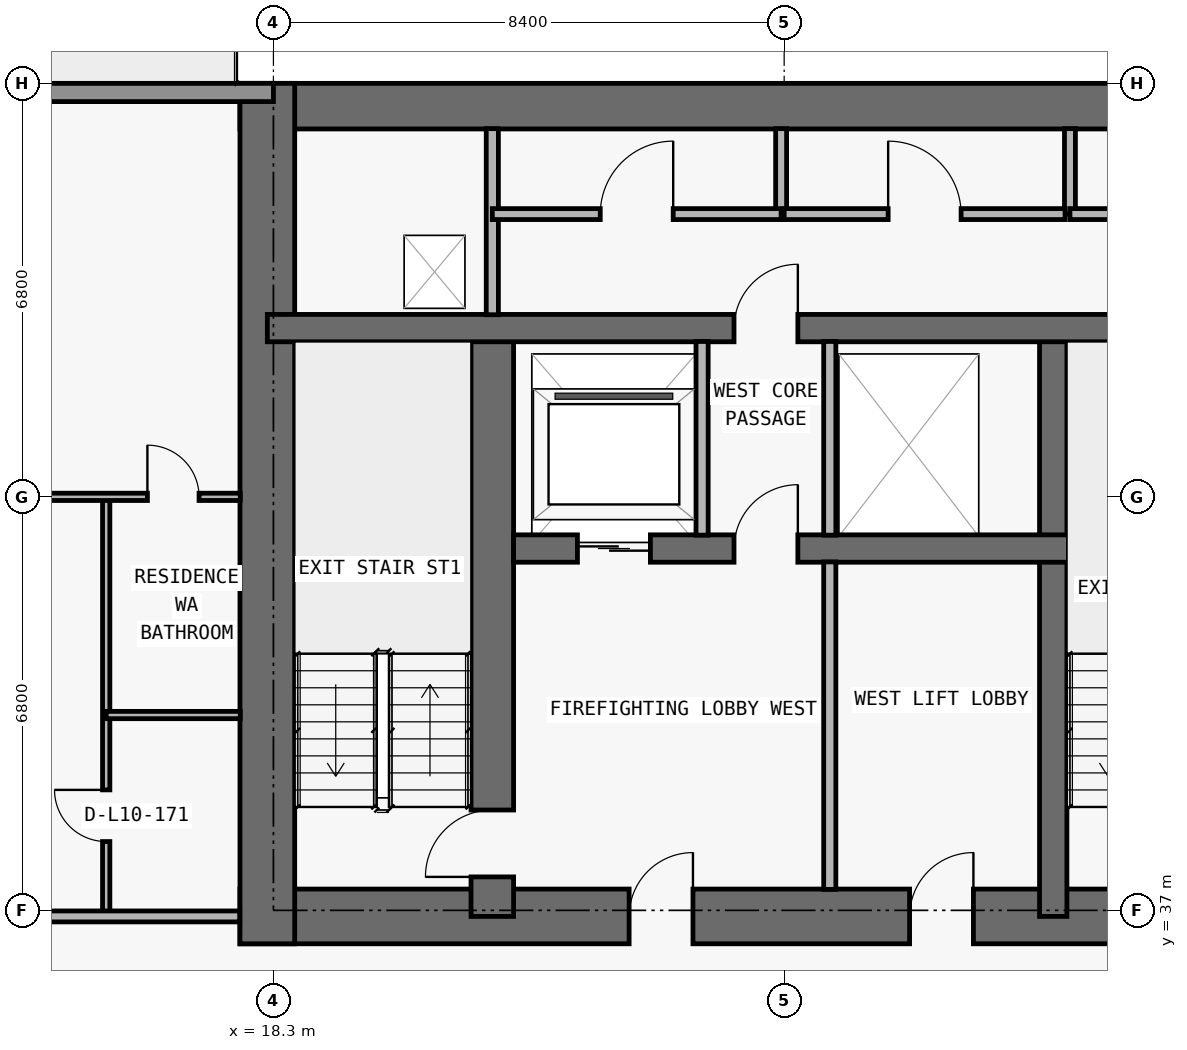
"""IFC4 building model, lengths in metres.
Left out: names, types, materials, properties, quantities, classifications, styles, units other than length and angle.
Written with IfcOpenShell. Run it as: python <this file> out.ifc"""

import sys

from ifc_helpers import new_model, si_unit, direction, frame, frame_2d, origin, place, context, subcontext, project, spatial, rectangle, extrude, element, fill, save


model = new_model("IFC4")
c1 = context("Model", 3, precision=1e-05, world=origin(), true_north=direction((0.0, 1.0)))
c2 = subcontext(c1, "Body", "Model", "MODEL_VIEW")
j1 = project(units=[si_unit("LENGTHUNIT", "METRE"), si_unit("PLANEANGLEUNIT", "RADIAN")], contexts=[c1])
p1 = place(None, origin())
s1 = spatial("IfcSite", under=j1, at=p1, CompositionType="ELEMENT")
p2 = place(p1, origin())
s2 = spatial("IfcBuilding", under=s1, at=p2, CompositionType="ELEMENT")
p3 = place(p2, frame((0.0, 0.0, 43.2)))
s3 = spatial("IfcBuildingStorey", under=s2, at=p3, CompositionType="ELEMENT", Elevation=43.2)
p4 = place(p3, frame((17.75, 36.9, 0.0), z_axis=(0.0, 0.0, 1.0), x_axis=(1.0, 0.0, 0.0)))
e1 = element("IfcWall", 1, at=p4, inside=s3, PredefinedType="SHEAR", context=c2, shape_type="SweptSolid", body=[
    extrude(rectangle(XDim=42.3, YDim=0.9, at=frame_2d((21.15, 0.0))), origin(), (0.0, 0.0, 1.0), 3.05),
])
p5 = place(p4, frame((14.55, 0.0, 0.0)))
e2 = element("IfcOpeningElement", 2, at=p5, cuts=e1, PredefinedType="OPENING", context=c2, shape_type="SweptSolid", body=[
    extrude(rectangle(XDim=1.1, YDim=2.15, at=frame_2d((0.55, 1.075))), frame((0.0, 0.46, 0.0), z_axis=(0.0, -1.0, 0.0), x_axis=(1.0, 0.0, 0.0)), (0.0, 0.0, 1.0), 0.92),
])
p6 = place(p4, frame((6.4, 0.0, 0.0)))
e3 = element("IfcOpeningElement", 3, at=p6, cuts=e1, PredefinedType="OPENING", context=c2, shape_type="SweptSolid", body=[
    extrude(rectangle(XDim=1.05, YDim=2.15, at=frame_2d((0.525, 1.075))), frame((0.0, 0.46, 0.0), z_axis=(0.0, -1.0, 0.0), x_axis=(1.0, 0.0, 0.0)), (0.0, 0.0, 1.0), 0.92),
])
p7 = place(p4, frame((34.9, 0.0, 0.0)))
e4 = element("IfcOpeningElement", 4, at=p7, cuts=e1, PredefinedType="OPENING", context=c2, shape_type="SweptSolid", body=[
    extrude(rectangle(XDim=1.05, YDim=2.15, at=frame_2d((0.525, 1.075))), frame((0.0, 0.46, 0.0), z_axis=(0.0, -1.0, 0.0), x_axis=(1.0, 0.0, 0.0)), (0.0, 0.0, 1.0), 0.92),
])
p8 = place(p4, frame((11.012, 0.0, 0.0)))
e5 = element("IfcOpeningElement", 5, at=p8, cuts=e1, PredefinedType="OPENING", context=c2, shape_type="SweptSolid", body=[
    extrude(rectangle(XDim=1.05, YDim=2.15, at=frame_2d((0.525, 1.075))), frame((0.0, 0.46, 0.0), z_axis=(0.0, -1.0, 0.0), x_axis=(1.0, 0.0, 0.0)), (0.0, 0.0, 1.0), 0.92),
])
p9 = place(p4, frame((24.25, 0.0, 0.0)))
e6 = element("IfcOpeningElement", 6, at=p9, cuts=e1, PredefinedType="OPENING", context=c2, shape_type="SweptSolid", body=[
    extrude(rectangle(XDim=1.05, YDim=2.15, at=frame_2d((0.525, 1.075))), frame((0.0, 0.46, 0.0), z_axis=(0.0, -1.0, 0.0), x_axis=(1.0, 0.0, 0.0)), (0.0, 0.0, 1.0), 0.92),
])
p10 = place(p3, frame((17.75, 50.225, 0.0), z_axis=(0.0, 0.0, 1.0), x_axis=(1.0, 0.0, 0.0)))
e7 = element("IfcWall", 7, at=p10, inside=s3, PredefinedType="SHEAR", context=c2, shape_type="SweptSolid", body=[
    extrude(rectangle(XDim=42.3, YDim=0.75, at=frame_2d((21.15, 0.0))), origin(), (0.0, 0.0, 1.0), 3.05),
])
p11 = place(p3, frame((18.2, 36.45, 0.0), z_axis=(0.0, 0.0, 1.0), x_axis=(0.0, 1.0, 0.0)))
e8 = element("IfcWall", 8, at=p11, inside=s3, PredefinedType="SHEAR", context=c2, shape_type="SweptSolid", body=[
    extrude(rectangle(XDim=14.15, YDim=0.9, at=frame_2d((7.075, 0.0))), origin(), (0.0, 0.0, 1.0), 3.05),
])
p12 = place(p3, frame((21.9, 36.9, 0.0), z_axis=(0.0, 0.0, 1.0), x_axis=(0.0, 1.0, 0.0)))
e9 = element("IfcWall", 9, at=p12, inside=s3, PredefinedType="SHEAR", context=c2, shape_type="SweptSolid", body=[
    extrude(rectangle(XDim=9.675, YDim=0.7, at=frame_2d((4.837, 0.0))), origin(), (0.0, 0.0, 1.0), 3.05),
])
p13 = place(p12, frame((0.65, 0.0, 0.0)))
e10 = element("IfcOpeningElement", 10, at=p13, cuts=e9, PredefinedType="OPENING", context=c2, shape_type="SweptSolid", body=[
    extrude(rectangle(XDim=1.1, YDim=2.15, at=frame_2d((0.55, 1.075))), frame((0.0, 0.36, 0.0), z_axis=(0.0, -1.0, 0.0), x_axis=(1.0, 0.0, 0.0)), (0.0, 0.0, 1.0), 0.72),
])
p14 = place(p3, frame((31.125, 36.9, 0.0), z_axis=(0.0, 0.0, 1.0), x_axis=(0.0, 1.0, 0.0)))
e11 = element("IfcWall", 11, at=p14, inside=s3, PredefinedType="SHEAR", context=c2, shape_type="SweptSolid", body=[
    extrude(rectangle(XDim=9.675, YDim=0.45, at=frame_2d((4.837, 0.0))), origin(), (0.0, 0.0, 1.0), 3.05),
])
p15 = place(p3, frame((22.25, 42.95, 0.0), z_axis=(0.0, 0.0, 1.0), x_axis=(1.0, 0.0, 0.0)))
e12 = element("IfcWall", 12, at=p15, inside=s3, PredefinedType="SHEAR", context=c2, shape_type="SweptSolid", body=[
    extrude(rectangle(XDim=33.3, YDim=0.45, at=frame_2d((16.65, 0.0))), origin(), (0.0, 0.0, 1.0), 3.05),
])
p16 = place(p15, frame((1.05, 0.0, 0.0)))
e13 = element("IfcOpeningElement", 13, at=p16, cuts=e12, PredefinedType="OPENING", context=c2, shape_type="SweptSolid", body=[
    extrude(rectangle(XDim=1.2, YDim=2.2, at=frame_2d((0.6, 1.1))), frame((0.0, 0.235, 0.0), z_axis=(0.0, -1.0, 0.0), x_axis=(1.0, 0.0, 0.0)), (0.0, 0.0, 1.0), 0.47),
])
p17 = place(p15, frame((31.05, 0.0, 0.0)))
e14 = element("IfcOpeningElement", 14, at=p17, cuts=e12, PredefinedType="OPENING", context=c2, shape_type="SweptSolid", body=[
    extrude(rectangle(XDim=1.2, YDim=2.2, at=frame_2d((0.6, 1.1))), frame((0.0, 0.235, 0.0), z_axis=(0.0, -1.0, 0.0), x_axis=(1.0, 0.0, 0.0)), (0.0, 0.0, 1.0), 0.47),
])
p18 = place(p15, frame((13.5, 0.0, 0.0)))
e15 = element("IfcOpeningElement", 15, at=p18, cuts=e12, PredefinedType="OPENING", context=c2, shape_type="SweptSolid", body=[
    extrude(rectangle(XDim=1.1, YDim=2.2, at=frame_2d((0.55, 1.1))), frame((0.0, 0.235, 0.0), z_axis=(0.0, -1.0, 0.0), x_axis=(1.0, 0.0, 0.0)), (0.0, 0.0, 1.0), 0.47),
])
p19 = place(p15, frame((16.1, 0.0, 0.0)))
e16 = element("IfcOpeningElement", 16, at=p19, cuts=e12, PredefinedType="OPENING", context=c2, shape_type="SweptSolid", body=[
    extrude(rectangle(XDim=1.1, YDim=2.2, at=frame_2d((0.55, 1.1))), frame((0.0, 0.235, 0.0), z_axis=(0.0, -1.0, 0.0), x_axis=(1.0, 0.0, 0.0)), (0.0, 0.0, 1.0), 0.47),
])
p20 = place(p15, frame((18.7, 0.0, 0.0)))
e17 = element("IfcOpeningElement", 17, at=p20, cuts=e12, PredefinedType="OPENING", context=c2, shape_type="SweptSolid", body=[
    extrude(rectangle(XDim=1.1, YDim=2.2, at=frame_2d((0.55, 1.1))), frame((0.0, 0.235, 0.0), z_axis=(0.0, -1.0, 0.0), x_axis=(1.0, 0.0, 0.0)), (0.0, 0.0, 1.0), 0.47),
])
p21 = place(p15, frame((3.625, 0.0, 0.0)))
e18 = element("IfcOpeningElement", 18, at=p21, cuts=e12, PredefinedType="OPENING", context=c2, shape_type="SweptSolid", body=[
    extrude(rectangle(XDim=1.05, YDim=2.15, at=frame_2d((0.525, 1.075))), frame((0.0, 0.235, 0.0), z_axis=(0.0, -1.0, 0.0), x_axis=(1.0, 0.0, 0.0)), (0.0, 0.0, 1.0), 0.47),
])
p22 = place(p15, frame((28.675, 0.0, 0.0)))
e19 = element("IfcOpeningElement", 19, at=p22, cuts=e12, PredefinedType="OPENING", context=c2, shape_type="SweptSolid", body=[
    extrude(rectangle(XDim=1.05, YDim=2.15, at=frame_2d((0.525, 1.075))), frame((0.0, 0.235, 0.0), z_axis=(0.0, -1.0, 0.0), x_axis=(1.0, 0.0, 0.0)), (0.0, 0.0, 1.0), 0.47),
])
p23 = place(p3, frame((18.2, 46.575, 0.0), z_axis=(0.0, 0.0, 1.0), x_axis=(1.0, 0.0, 0.0)))
e20 = element("IfcWall", 20, at=p23, inside=s3, PredefinedType="SHEAR", context=c2, shape_type="SweptSolid", body=[
    extrude(rectangle(XDim=41.4, YDim=0.45, at=frame_2d((20.7, 0.0))), origin(), (0.0, 0.0, 1.0), 3.05),
])
p24 = place(p23, frame((7.675, 0.0, 0.0)))
e21 = element("IfcOpeningElement", 21, at=p24, cuts=e20, PredefinedType="OPENING", context=c2, shape_type="SweptSolid", body=[
    extrude(rectangle(XDim=1.05, YDim=2.15, at=frame_2d((0.525, 1.075))), frame((0.0, 0.235, 0.0), z_axis=(0.0, -1.0, 0.0), x_axis=(1.0, 0.0, 0.0)), (0.0, 0.0, 1.0), 0.47),
])
p25 = place(p23, frame((32.725, 0.0, 0.0)))
e22 = element("IfcOpeningElement", 22, at=p25, cuts=e20, PredefinedType="OPENING", context=c2, shape_type="SweptSolid", body=[
    extrude(rectangle(XDim=1.05, YDim=2.15, at=frame_2d((0.525, 1.075))), frame((0.0, 0.235, 0.0), z_axis=(0.0, -1.0, 0.0), x_axis=(1.0, 0.0, 0.0)), (0.0, 0.0, 1.0), 0.47),
])
p26 = place(p3, frame((5.1, 50.45, 0.0), z_axis=(0.0, 0.0, 1.0), x_axis=(1.0, 0.0, 0.0)))
e23 = element("IfcWall", 23, at=p26, inside=s3, PredefinedType="STANDARD", context=c2, shape_type="SweptSolid", body=[
    extrude(rectangle(XDim=13.2, YDim=0.3, at=frame_2d((6.6, 0.0))), origin(), (0.0, 0.0, 1.0), 3.05),
])
p27 = place(p26, frame((5.6, 0.0, 0.0)))
e24 = element("IfcOpeningElement", 24, at=p27, cuts=e23, PredefinedType="OPENING", context=c2, shape_type="SweptSolid", body=[
    extrude(rectangle(XDim=2.0, YDim=2.3, at=frame_2d((1.0, 1.15))), frame((0.0, 0.16, 0.0), z_axis=(0.0, -1.0, 0.0), x_axis=(1.0, 0.0, 0.0)), (0.0, 0.0, 1.0), 0.32),
])
p28 = place(p3, frame((15.55, 36.9, 0.0), z_axis=(0.0, 0.0, 1.0), x_axis=(0.0, 1.0, 0.0)))
e25 = element("IfcWall", 25, at=p28, inside=s3, PredefinedType="PARTITIONING", context=c2, shape_type="SweptSolid", body=[
    extrude(rectangle(XDim=6.9, YDim=0.12, at=frame_2d((3.45, 0.0))), origin(), (0.0, 0.0, 1.0), 3.05),
])
p29 = place(p28, frame((1.231, 0.0, 0.0)))
e26 = element("IfcOpeningElement", 26, at=p29, cuts=e25, PredefinedType="OPENING", context=c2, shape_type="SweptSolid", body=[
    extrude(rectangle(XDim=0.85, YDim=2.1, at=frame_2d((0.425, 1.05))), frame((0.0, 0.07, 0.0), z_axis=(0.0, -1.0, 0.0), x_axis=(1.0, 0.0, 0.0)), (0.0, 0.0, 1.0), 0.14),
])
p30 = place(p3, frame((21.9, 46.795, 0.0), z_axis=(0.0, 0.0, 1.0), x_axis=(0.0, 1.0, 0.0)))
e27 = element("IfcWall", 27, at=p30, inside=s3, PredefinedType="PARTITIONING", context=c2, shape_type="SweptSolid", body=[
    extrude(rectangle(XDim=3.06, YDim=0.2, at=frame_2d((1.53, 0.0))), origin(), (0.0, 0.0, 1.0), 3.05),
])
p31 = place(p3, frame((25.35, 43.17, 0.0), z_axis=(0.0, 0.0, 1.0), x_axis=(0.0, 1.0, 0.0)))
e28 = element("IfcWall", 28, at=p31, inside=s3, PredefinedType="PARTITIONING", context=c2, shape_type="SweptSolid", body=[
    extrude(rectangle(XDim=3.185, YDim=0.2, at=frame_2d((1.593, 0.0))), origin(), (0.0, 0.0, 1.0), 3.05),
])
p32 = place(p3, frame((26.65, 48.45, 0.0), z_axis=(0.0, 0.0, 1.0), x_axis=(0.0, 1.0, 0.0)))
e29 = element("IfcWall", 29, at=p32, inside=s3, PredefinedType="PARTITIONING", context=c2, shape_type="SweptSolid", body=[
    extrude(rectangle(XDim=1.405, YDim=0.18, at=frame_2d((0.703, 0.0))), origin(), (0.0, 0.0, 1.0), 3.05),
])
p33 = place(p3, frame((27.45, 37.345, 0.0), z_axis=(0.0, 0.0, 1.0), x_axis=(0.0, 1.0, 0.0)))
e30 = element("IfcWall", 30, at=p33, inside=s3, PredefinedType="PARTITIONING", context=c2, shape_type="SweptSolid", body=[
    extrude(rectangle(XDim=5.385, YDim=0.2, at=frame_2d((2.692, 0.0))), origin(), (0.0, 0.0, 1.0), 3.05),
])
p34 = place(p3, frame((27.45, 43.17, 0.0), z_axis=(0.0, 0.0, 1.0), x_axis=(0.0, 1.0, 0.0)))
e31 = element("IfcWall", 31, at=p34, inside=s3, PredefinedType="PARTITIONING", context=c2, shape_type="SweptSolid", body=[
    extrude(rectangle(XDim=3.185, YDim=0.2, at=frame_2d((1.593, 0.0))), origin(), (0.0, 0.0, 1.0), 3.05),
])
p35 = place(p3, frame((31.4, 48.45, 0.0), z_axis=(0.0, 0.0, 1.0), x_axis=(0.0, 1.0, 0.0)))
e32 = element("IfcWall", 32, at=p35, inside=s3, PredefinedType="PARTITIONING", context=c2, shape_type="SweptSolid", body=[
    extrude(rectangle(XDim=1.405, YDim=0.18, at=frame_2d((0.703, 0.0))), origin(), (0.0, 0.0, 1.0), 3.05),
])
p36 = place(p3, frame((5.1, 36.9, 0.0), z_axis=(0.0, 0.0, 1.0), x_axis=(1.0, 0.0, 0.0)))
e33 = element("IfcWall", 33, at=p36, inside=s3, PredefinedType="PARTITIONING", context=c2, shape_type="SweptSolid", body=[
    extrude(rectangle(XDim=12.645, YDim=0.18, at=frame_2d((6.323, 0.0))), origin(), (0.0, 0.0, 1.0), 3.05),
])
p37 = place(p36, frame((7.125, 0.0, 0.0)))
e34 = element("IfcOpeningElement", 34, at=p37, cuts=e33, PredefinedType="OPENING", context=c2, shape_type="SweptSolid", body=[
    extrude(rectangle(XDim=1.0, YDim=2.2, at=frame_2d((0.5, 1.1))), frame((0.0, 0.1, 0.0), z_axis=(0.0, -1.0, 0.0), x_axis=(1.0, 0.0, 0.0)), (0.0, 0.0, 1.0), 0.2),
])
p38 = place(p3, frame((15.55, 40.212, 0.0), z_axis=(0.0, 0.0, 1.0), x_axis=(1.0, 0.0, 0.0)))
e35 = element("IfcWall", 35, at=p38, inside=s3, PredefinedType="PARTITIONING", context=c2, shape_type="SweptSolid", body=[
    extrude(rectangle(XDim=2.205, YDim=0.12, at=frame_2d((1.103, 0.0))), origin(), (0.0, 0.0, 1.0), 3.05),
])
p39 = place(p3, frame((1.795, 43.8, 0.0), z_axis=(0.0, 0.0, 1.0), x_axis=(1.0, 0.0, 0.0)))
e36 = element("IfcWall", 36, at=p39, inside=s3, PredefinedType="PARTITIONING", context=c2, shape_type="SweptSolid", body=[
    extrude(rectangle(XDim=15.96, YDim=0.12, at=frame_2d((7.98, 0.0))), origin(), (0.0, 0.0, 1.0), 2.339),
])
p40 = place(p39, frame((5.255, 0.0, 0.0)))
e37 = element("IfcOpeningElement", 37, at=p40, cuts=e36, PredefinedType="OPENING", context=c2, shape_type="SweptSolid", body=[
    extrude(rectangle(XDim=0.9, YDim=2.15, at=frame_2d((0.45, 1.075))), frame((0.0, 0.07, 0.0), z_axis=(0.0, -1.0, 0.0), x_axis=(1.0, 0.0, 0.0)), (0.0, 0.0, 1.0), 0.14),
])
p41 = place(p39, frame((10.48, 0.0, 0.0)))
e38 = element("IfcOpeningElement", 38, at=p41, cuts=e36, PredefinedType="OPENING", context=c2, shape_type="SweptSolid", body=[
    extrude(rectangle(XDim=0.9, YDim=2.15, at=frame_2d((0.45, 1.075))), frame((0.0, 0.07, 0.0), z_axis=(0.0, -1.0, 0.0), x_axis=(1.0, 0.0, 0.0)), (0.0, 0.0, 1.0), 0.14),
])
p42 = place(p39, frame((14.433, 0.0, 0.0)))
e39 = element("IfcOpeningElement", 39, at=p42, cuts=e36, PredefinedType="OPENING", context=c2, shape_type="SweptSolid", body=[
    extrude(rectangle(XDim=0.85, YDim=2.1, at=frame_2d((0.425, 1.05))), frame((0.0, 0.07, 0.0), z_axis=(0.0, -1.0, 0.0), x_axis=(1.0, 0.0, 0.0)), (0.0, 0.0, 1.0), 0.14),
])
p43 = place(p3, frame((21.9, 48.45, 0.0), z_axis=(0.0, 0.0, 1.0), x_axis=(1.0, 0.0, 0.0)))
e40 = element("IfcWall", 40, at=p43, inside=s3, PredefinedType="PARTITIONING", context=c2, shape_type="SweptSolid", body=[
    extrude(rectangle(XDim=4.75, YDim=0.18, at=frame_2d((2.375, 0.0))), origin(), (0.0, 0.0, 1.0), 3.05),
])
p44 = place(p43, frame((1.775, 0.0, 0.0)))
e41 = element("IfcOpeningElement", 41, at=p44, cuts=e40, PredefinedType="OPENING", context=c2, shape_type="SweptSolid", body=[
    extrude(rectangle(XDim=1.2, YDim=2.2, at=frame_2d((0.6, 1.1))), frame((0.0, 0.1, 0.0), z_axis=(0.0, -1.0, 0.0), x_axis=(1.0, 0.0, 0.0)), (0.0, 0.0, 1.0), 0.2),
])
p45 = place(p3, frame((26.7, 48.45, 0.0), z_axis=(0.0, 0.0, 1.0), x_axis=(1.0, 0.0, 0.0)))
e42 = element("IfcWall", 42, at=p45, inside=s3, PredefinedType="PARTITIONING", context=c2, shape_type="SweptSolid", body=[
    extrude(rectangle(XDim=4.62, YDim=0.18, at=frame_2d((2.31, 0.0))), origin(), (0.0, 0.0, 1.0), 3.05),
])
p46 = place(p45, frame((1.71, 0.0, 0.0)))
e43 = element("IfcOpeningElement", 43, at=p46, cuts=e42, PredefinedType="OPENING", context=c2, shape_type="SweptSolid", body=[
    extrude(rectangle(XDim=1.2, YDim=2.2, at=frame_2d((0.6, 1.1))), frame((0.0, 0.1, 0.0), z_axis=(0.0, -1.0, 0.0), x_axis=(1.0, 0.0, 0.0)), (0.0, 0.0, 1.0), 0.2),
])
p47 = place(p3, frame((31.4, 48.45, 0.0), z_axis=(0.0, 0.0, 1.0), x_axis=(1.0, 0.0, 0.0)))
e44 = element("IfcWall", 44, at=p47, inside=s3, PredefinedType="PARTITIONING", context=c2, shape_type="SweptSolid", body=[
    extrude(rectangle(XDim=24.5, YDim=0.18, at=frame_2d((12.25, 0.0))), origin(), (0.0, 0.0, 1.0), 3.05),
])
p48 = place(p47, frame((1.775, 0.0, 0.0)))
e45 = element("IfcOpeningElement", 45, at=p48, cuts=e44, PredefinedType="OPENING", context=c2, shape_type="SweptSolid", body=[
    extrude(rectangle(XDim=1.2, YDim=2.2, at=frame_2d((0.6, 1.1))), frame((0.0, 0.1, 0.0), z_axis=(0.0, -1.0, 0.0), x_axis=(1.0, 0.0, 0.0)), (0.0, 0.0, 1.0), 0.2),
])
p49 = place(p47, frame((9.35, 0.0, 0.0)))
e46 = element("IfcOpeningElement", 46, at=p49, cuts=e44, PredefinedType="OPENING", context=c2, shape_type="SweptSolid", body=[
    extrude(rectangle(XDim=1.0, YDim=2.2, at=frame_2d((0.5, 1.1))), frame((0.0, 0.1, 0.0), z_axis=(0.0, -1.0, 0.0), x_axis=(1.0, 0.0, 0.0)), (0.0, 0.0, 1.0), 0.2),
])
p50 = place(p47, frame((16.725, 0.0, 0.0)))
e47 = element("IfcOpeningElement", 47, at=p50, cuts=e44, PredefinedType="OPENING", context=c2, shape_type="SweptSolid", body=[
    extrude(rectangle(XDim=1.2, YDim=2.2, at=frame_2d((0.6, 1.1))), frame((0.0, 0.1, 0.0), z_axis=(0.0, -1.0, 0.0), x_axis=(1.0, 0.0, 0.0)), (0.0, 0.0, 1.0), 0.2),
])
p51 = place(p47, frame((21.675, 0.0, 0.0)))
e48 = element("IfcOpeningElement", 48, at=p51, cuts=e44, PredefinedType="OPENING", context=c2, shape_type="SweptSolid", body=[
    extrude(rectangle(XDim=0.85, YDim=2.1, at=frame_2d((0.425, 1.05))), frame((0.0, 0.1, 0.0), z_axis=(0.0, -1.0, 0.0), x_axis=(1.0, 0.0, 0.0)), (0.0, 0.0, 1.0), 0.2),
])
p52 = place(p16, origin())
e49 = element("IfcDoor", 49, at=p52, inside=s3, OperationType="DOUBLE_DOOR_SLIDING", PredefinedType="DOOR", context=c2, shape_type="SweptSolid", body=[
    extrude(rectangle(XDim=1.2, YDim=2.2, at=frame_2d((0.6, 1.1))), frame((0.0, 0.025, 0.0), z_axis=(0.0, -1.0, 0.0), x_axis=(1.0, 0.0, 0.0)), (0.0, 0.0, 1.0), 0.05),
])
fill(e13, e49)
p53 = place(p6, origin())
e50 = element("IfcDoor", 50, at=p53, inside=s3, OperationType="SINGLE_SWING_RIGHT", PredefinedType="DOOR", context=c2, shape_type="SweptSolid", body=[
    extrude(rectangle(XDim=1.05, YDim=2.15, at=frame_2d((0.525, 1.075))), frame((0.0, 0.025, 0.0), z_axis=(0.0, -1.0, 0.0), x_axis=(1.0, 0.0, 0.0)), (0.0, 0.0, 1.0), 0.05),
])
fill(e3, e50)
p54 = place(p13, origin())
e51 = element("IfcDoor", 51, at=p54, inside=s3, OperationType="SINGLE_SWING_LEFT", PredefinedType="DOOR", context=c2, shape_type="SweptSolid", body=[
    extrude(rectangle(XDim=1.1, YDim=2.15, at=frame_2d((0.55, 1.075))), frame((0.0, 0.025, 0.0), z_axis=(0.0, -1.0, 0.0), x_axis=(1.0, 0.0, 0.0)), (0.0, 0.0, 1.0), 0.05),
])
fill(e10, e51)
p55 = place(p21, origin())
e52 = element("IfcDoor", 52, at=p55, inside=s3, OperationType="SINGLE_SWING_RIGHT", PredefinedType="DOOR", context=c2, shape_type="SweptSolid", body=[
    extrude(rectangle(XDim=1.05, YDim=2.15, at=frame_2d((0.525, 1.075))), frame((0.0, 0.025, 0.0), z_axis=(0.0, -1.0, 0.0), x_axis=(1.0, 0.0, 0.0)), (0.0, 0.0, 1.0), 0.05),
])
fill(e18, e52)
p56 = place(p8, origin())
e53 = element("IfcDoor", 53, at=p56, inside=s3, OperationType="SINGLE_SWING_RIGHT", PredefinedType="DOOR", context=c2, shape_type="SweptSolid", body=[
    extrude(rectangle(XDim=1.05, YDim=2.15, at=frame_2d((0.525, 1.075))), frame((0.0, 0.025, 0.0), z_axis=(0.0, -1.0, 0.0), x_axis=(1.0, 0.0, 0.0)), (0.0, 0.0, 1.0), 0.05),
])
fill(e5, e53)
p57 = place(p24, origin())
e54 = element("IfcDoor", 54, at=p57, inside=s3, OperationType="SINGLE_SWING_RIGHT", PredefinedType="DOOR", context=c2, shape_type="SweptSolid", body=[
    extrude(rectangle(XDim=1.05, YDim=2.15, at=frame_2d((0.525, 1.075))), frame((0.0, 0.025, 0.0), z_axis=(0.0, -1.0, 0.0), x_axis=(1.0, 0.0, 0.0)), (0.0, 0.0, 1.0), 0.05),
])
fill(e21, e54)
p58 = place(p44, origin())
e55 = element("IfcDoor", 55, at=p58, inside=s3, OperationType="SINGLE_SWING_RIGHT", PredefinedType="DOOR", context=c2, shape_type="SweptSolid", body=[
    extrude(rectangle(XDim=1.2, YDim=2.2, at=frame_2d((0.6, 1.1))), frame((0.0, 0.025, 0.0), z_axis=(0.0, -1.0, 0.0), x_axis=(1.0, 0.0, 0.0)), (0.0, 0.0, 1.0), 0.05),
])
fill(e41, e55)
p59 = place(p46, origin())
e56 = element("IfcDoor", 56, at=p59, inside=s3, OperationType="SINGLE_SWING_LEFT", PredefinedType="DOOR", context=c2, shape_type="SweptSolid", body=[
    extrude(rectangle(XDim=1.2, YDim=2.2, at=frame_2d((0.6, 1.1))), frame((0.0, 0.025, 0.0), z_axis=(0.0, -1.0, 0.0), x_axis=(1.0, 0.0, 0.0)), (0.0, 0.0, 1.0), 0.05),
])
fill(e43, e56)
p60 = place(p29, origin())
e57 = element("IfcDoor", 57, at=p60, inside=s3, OperationType="SINGLE_SWING_RIGHT", PredefinedType="DOOR", context=c2, shape_type="SweptSolid", body=[
    extrude(rectangle(XDim=0.85, YDim=2.1, at=frame_2d((0.425, 1.05))), frame((0.0, 0.025, 0.0), z_axis=(0.0, -1.0, 0.0), x_axis=(1.0, 0.0, 0.0)), (0.0, 0.0, 1.0), 0.05),
])
fill(e26, e57)
p61 = place(p42, origin())
e58 = element("IfcDoor", 58, at=p61, inside=s3, OperationType="SINGLE_SWING_LEFT", PredefinedType="DOOR", context=c2, shape_type="SweptSolid", body=[
    extrude(rectangle(XDim=0.85, YDim=2.1, at=frame_2d((0.425, 1.05))), frame((0.0, 0.025, 0.0), z_axis=(0.0, -1.0, 0.0), x_axis=(1.0, 0.0, 0.0)), (0.0, 0.0, 1.0), 0.05),
])
fill(e39, e58)
save(model, sys.argv[1])
